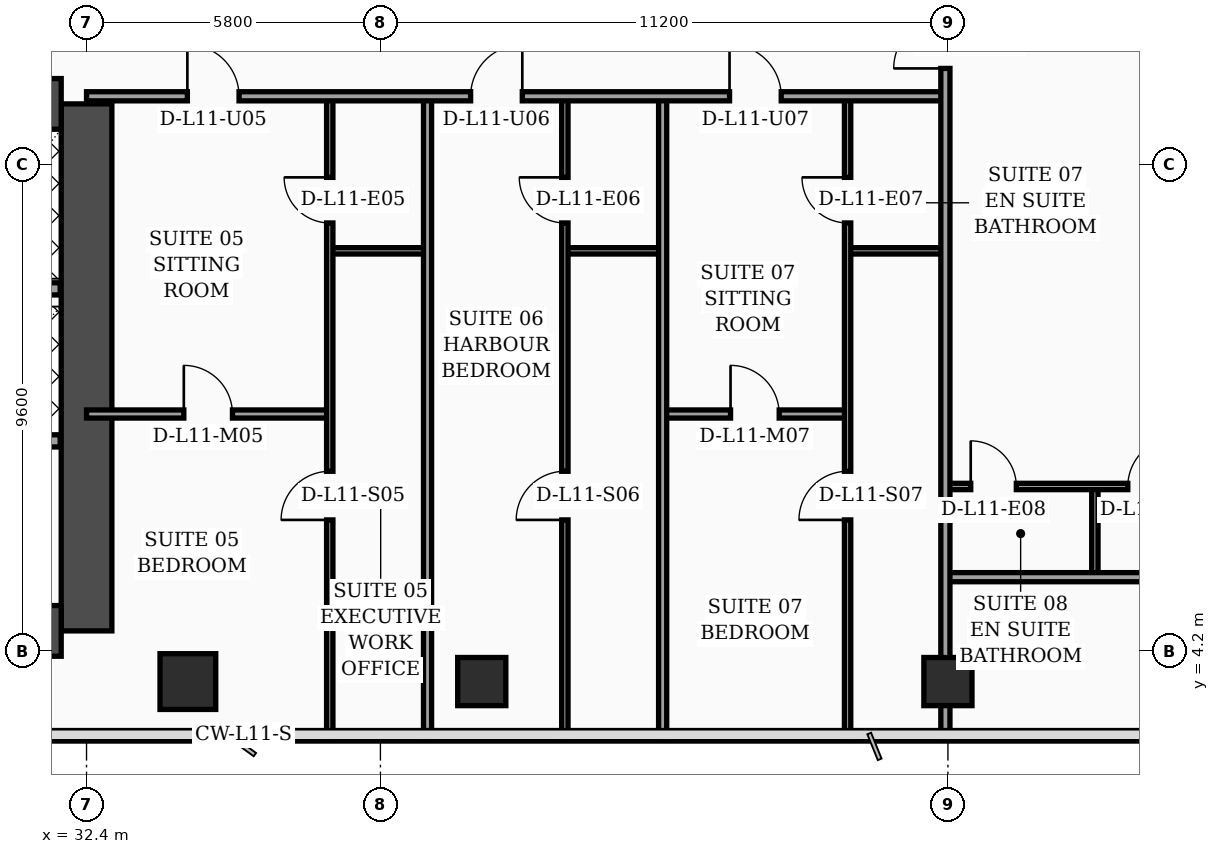
"""IFC4 building model, lengths in metres.
Left out: names, types, materials, properties, quantities, classifications, styles, units other than length and angle.
Written with IfcOpenShell. Run it as: python <this file> out.ifc"""

import sys

from ifc_helpers import new_model, si_unit, direction, frame, frame_2d, origin, origin_2d, place, context, subcontext, project, spatial, rectangle, hollow_rectangle, extrude, element, fill, save


model = new_model("IFC4")
c1 = context("Model", 3, precision=1e-05, world=origin(), true_north=direction((0.0, 1.0)))
c2 = subcontext(c1, "Body", "Model", "MODEL_VIEW")
j1 = project(units=[si_unit("LENGTHUNIT", "METRE"), si_unit("PLANEANGLEUNIT", "RADIAN")], contexts=[c1])
p1 = place(None, origin())
s1 = spatial("IfcSite", under=j1, at=p1, CompositionType="ELEMENT")
p2 = place(p1, origin())
s2 = spatial("IfcBuilding", under=s1, at=p2, CompositionType="ELEMENT")
p3 = place(p2, frame((0.0, 0.0, 50.8)))
s3 = spatial("IfcBuildingStorey", under=s2, at=p3, CompositionType="ELEMENT", Elevation=50.8)
p4 = place(p3, frame((32.4, 4.6, 0.0), z_axis=(0.0, 0.0, 1.0), x_axis=(0.0, 1.0, 0.0)))
e1 = element("IfcWall", 1, at=p4, inside=s3, PredefinedType="SHEAR", context=c2, shape_type="SweptSolid", body=[
    extrude(rectangle(XDim=10.4, YDim=1.0, at=frame_2d((5.2, 0.0))), origin(), (0.0, 0.0, 1.0), 3.56),
])
p5 = place(p3, frame((22.1, 15.0, 0.0), z_axis=(0.0, 0.0, 1.0), x_axis=(1.0, 0.0, 0.0)))
e2 = element("IfcWall", 2, at=p5, inside=s3, PredefinedType="SHEAR", context=c2, shape_type="SweptSolid", body=[
    extrude(rectangle(XDim=9.8, YDim=1.0, at=frame_2d((4.9, 0.0))), origin(), (0.0, 0.0, 1.0), 3.56),
])
p6 = place(p5, frame((4.8, 0.0, 0.0)))
e3 = element("IfcOpeningElement", 3, at=p6, cuts=e2, PredefinedType="OPENING", context=c2, shape_type="SweptSolid", body=[
    extrude(rectangle(XDim=1.1, YDim=2.2, at=frame_2d((0.55, 1.1))), frame((0.0, 0.51, 0.0), z_axis=(0.0, -1.0, 0.0), x_axis=(1.0, 0.0, 0.0)), (0.0, 0.0, 1.0), 1.02),
])
p7 = place(p3, frame((22.1, 4.6, 0.0), z_axis=(0.0, 0.0, 1.0), x_axis=(1.0, 0.0, 0.0)))
e4 = element("IfcWall", 4, at=p7, inside=s3, PredefinedType="SHEAR", context=c2, shape_type="SweptSolid", body=[
    extrude(rectangle(XDim=9.8, YDim=1.0, at=frame_2d((4.9, 0.0))), origin(), (0.0, 0.0, 1.0), 3.56),
])
p8 = place(p3, frame((34.4, 3.6, 0.0), z_axis=(0.0, 0.0, 1.0), x_axis=(1.0, 0.0, 0.0)))
e5 = element("IfcColumn", 5, at=p8, inside=s3, PredefinedType="COLUMN", context=c2, shape_type="SweptSolid", body=[
    extrude(hollow_rectangle(XDim=1.1, YDim=1.1, WallThickness=0.045, at=origin_2d()), origin(), (0.0, 0.0, 1.0), 3.56),
])
for number, where, z_axis, x_axis in (
    (6, (40.2, 3.6, 0.0), (0.0, 0.0, 1.0), (1.0, 0.0, 0.0)),
    (7, (49.4, 3.6, 0.0), (0.0, 0.0, 1.0), (1.0, 0.0, 0.0)),
):
    element("IfcColumn", number, at=place(p3, frame(where, z_axis=z_axis, x_axis=x_axis)), inside=s3, PredefinedType="COLUMN", context=c2, shape_type="SweptSolid", body=[
        extrude(hollow_rectangle(XDim=0.95, YDim=0.95, WallThickness=0.04, at=origin_2d()), origin(), (0.0, 0.0, 1.0), 3.56),
    ])
p9 = place(p3, frame((27.02, 11.35, 0.0), z_axis=(0.0, 0.0, 1.0), x_axis=(1.0, 0.0, 0.0)))
e8 = element("IfcWall", 8, at=p9, inside=s3, PredefinedType="SOLIDWALL", context=c2, shape_type="SweptSolid", body=[
    extrude(rectangle(XDim=4.86, YDim=0.24, at=frame_2d((2.43, 0.0))), origin(), (0.0, 0.0, 1.0), 3.56),
])
p10 = place(p9, frame((0.45, 0.0, 0.0)))
e9 = element("IfcOpeningElement", 9, at=p10, cuts=e8, PredefinedType="OPENING", context=c2, shape_type="SweptSolid", body=[
    extrude(rectangle(XDim=1.3, YDim=2.35, at=frame_2d((0.65, 1.175))), frame((0.0, 0.13, 0.0), z_axis=(0.0, -1.0, 0.0), x_axis=(1.0, 0.0, 0.0)), (0.0, 0.0, 1.0), 0.26),
])
p11 = place(p3, frame((27.02, 8.35, 0.0), z_axis=(0.0, 0.0, 1.0), x_axis=(1.0, 0.0, 0.0)))
e10 = element("IfcWall", 10, at=p11, inside=s3, PredefinedType="SOLIDWALL", context=c2, shape_type="SweptSolid", body=[
    extrude(rectangle(XDim=4.86, YDim=0.24, at=frame_2d((2.43, 0.0))), origin(), (0.0, 0.0, 1.0), 3.09),
])
p12 = place(p3, frame((37.2, 12.1, 0.0), z_axis=(0.0, 0.0, 1.0), x_axis=(1.0, 0.0, 0.0)))
e11 = element("IfcWall", 11, at=p12, inside=s3, PredefinedType="PARTITIONING", context=c2, shape_type="SweptSolid", body=[
    extrude(rectangle(XDim=1.93, YDim=0.125, at=frame_2d((0.965, 0.0))), origin(), (0.0, 0.0, 1.0), 3.56),
])
p13 = place(p3, frame((32.4, 8.88, 0.0), z_axis=(0.0, 0.0, 1.0), x_axis=(1.0, 0.0, 0.0)))
e12 = element("IfcWall", 12, at=p13, inside=s3, PredefinedType="PARTITIONING", context=c2, shape_type="SweptSolid", body=[
    extrude(rectangle(XDim=4.8, YDim=0.16, at=frame_2d((2.4, 0.0))), origin(), (0.0, 0.0, 1.0), 2.84),
])
p14 = place(p13, frame((1.92, 0.0, 0.0)))
e13 = element("IfcOpeningElement", 13, at=p14, cuts=e12, PredefinedType="OPENING", context=c2, shape_type="SweptSolid", body=[
    extrude(rectangle(XDim=0.96, YDim=2.2, at=frame_2d((0.48, 1.1))), frame((0.0, 0.09, 0.0), z_axis=(0.0, -1.0, 0.0), x_axis=(1.0, 0.0, 0.0)), (0.0, 0.0, 1.0), 0.18),
])
p15 = place(p3, frame((37.2, 2.44, 0.0), z_axis=(0.0, 0.0, 1.0), x_axis=(0.0, 1.0, 0.0)))
e14 = element("IfcWall", 14, at=p15, inside=s3, PredefinedType="PARTITIONING", context=c2, shape_type="SweptSolid", body=[
    extrude(rectangle(XDim=12.71, YDim=0.125, at=frame_2d((6.355, 0.0))), origin(), (0.0, 0.0, 1.0), 2.84),
])
p16 = place(p15, frame((4.35, 0.0, 0.0)))
e15 = element("IfcOpeningElement", 15, at=p16, cuts=e14, PredefinedType="OPENING", context=c2, shape_type="SweptSolid", body=[
    extrude(rectangle(XDim=0.96, YDim=2.2, at=frame_2d((0.48, 1.1))), frame((0.0, 0.073, 0.0), z_axis=(0.0, -1.0, 0.0), x_axis=(1.0, 0.0, 0.0)), (0.0, 0.0, 1.0), 0.145),
])
p17 = place(p15, frame((10.21, 0.0, 0.0)))
e16 = element("IfcOpeningElement", 16, at=p17, cuts=e14, PredefinedType="OPENING", context=c2, shape_type="SweptSolid", body=[
    extrude(rectangle(XDim=0.9, YDim=2.15, at=frame_2d((0.45, 1.075))), frame((0.0, 0.073, 0.0), z_axis=(0.0, -1.0, 0.0), x_axis=(1.0, 0.0, 0.0)), (0.0, 0.0, 1.0), 0.145),
])
p18 = place(p3, frame((41.84, 12.1, 0.0), z_axis=(0.0, 0.0, 1.0), x_axis=(1.0, 0.0, 0.0)))
e17 = element("IfcWall", 17, at=p18, inside=s3, PredefinedType="PARTITIONING", context=c2, shape_type="SweptSolid", body=[
    extrude(rectangle(XDim=1.93, YDim=0.125, at=frame_2d((0.965, 0.0))), origin(), (0.0, 0.0, 1.0), 3.56),
])
p19 = place(p3, frame((41.84, 2.44, 0.0), z_axis=(0.0, 0.0, 1.0), x_axis=(0.0, 1.0, 0.0)))
e18 = element("IfcWall", 18, at=p19, inside=s3, PredefinedType="PARTITIONING", context=c2, shape_type="SweptSolid", body=[
    extrude(rectangle(XDim=12.71, YDim=0.125, at=frame_2d((6.355, 0.0))), origin(), (0.0, 0.0, 1.0), 3.04),
])
p20 = place(p19, frame((4.35, 0.0, 0.0)))
e19 = element("IfcOpeningElement", 19, at=p20, cuts=e18, PredefinedType="OPENING", context=c2, shape_type="SweptSolid", body=[
    extrude(rectangle(XDim=0.96, YDim=2.2, at=frame_2d((0.48, 1.1))), frame((0.0, 0.073, 0.0), z_axis=(0.0, -1.0, 0.0), x_axis=(1.0, 0.0, 0.0)), (0.0, 0.0, 1.0), 0.145),
])
p21 = place(p19, frame((10.21, 0.0, 0.0)))
e20 = element("IfcOpeningElement", 20, at=p21, cuts=e18, PredefinedType="OPENING", context=c2, shape_type="SweptSolid", body=[
    extrude(rectangle(XDim=0.9, YDim=2.15, at=frame_2d((0.45, 1.075))), frame((0.0, 0.073, 0.0), z_axis=(0.0, -1.0, 0.0), x_axis=(1.0, 0.0, 0.0)), (0.0, 0.0, 1.0), 0.145),
])
p22 = place(p3, frame((39.13, 2.44, 0.0), z_axis=(0.0, 0.0, 1.0), x_axis=(0.0, 1.0, 0.0)))
e21 = element("IfcWall", 21, at=p22, inside=s3, PredefinedType="PARTITIONING", context=c2, shape_type="SweptSolid", body=[
    extrude(rectangle(XDim=12.71, YDim=0.16, at=frame_2d((6.355, 0.0))), origin(), (0.0, 0.0, 1.0), 2.84),
])
p23 = place(p3, frame((47.42, 12.1, 0.0), z_axis=(0.0, 0.0, 1.0), x_axis=(1.0, 0.0, 0.0)))
e22 = element("IfcWall", 22, at=p23, inside=s3, PredefinedType="PARTITIONING", context=c2, shape_type="SweptSolid", body=[
    extrude(rectangle(XDim=1.93, YDim=0.125, at=frame_2d((0.965, 0.0))), origin(), (0.0, 0.0, 1.0), 2.84),
])
p24 = place(p3, frame((43.77, 8.88, 0.0), z_axis=(0.0, 0.0, 1.0), x_axis=(1.0, 0.0, 0.0)))
e23 = element("IfcWall", 23, at=p24, inside=s3, PredefinedType="PARTITIONING", context=c2, shape_type="SweptSolid", body=[
    extrude(rectangle(XDim=3.65, YDim=0.16, at=frame_2d((1.825, 0.0))), origin(), (0.0, 0.0, 1.0), 3.09),
])
p25 = place(p24, frame((1.34, 0.0, 0.0)))
e24 = element("IfcOpeningElement", 24, at=p25, cuts=e23, PredefinedType="OPENING", context=c2, shape_type="SweptSolid", body=[
    extrude(rectangle(XDim=0.96, YDim=2.2, at=frame_2d((0.48, 1.1))), frame((0.0, 0.09, 0.0), z_axis=(0.0, -1.0, 0.0), x_axis=(1.0, 0.0, 0.0)), (0.0, 0.0, 1.0), 0.18),
])
p26 = place(p3, frame((47.42, 2.44, 0.0), z_axis=(0.0, 0.0, 1.0), x_axis=(0.0, 1.0, 0.0)))
e25 = element("IfcWall", 25, at=p26, inside=s3, PredefinedType="PARTITIONING", context=c2, shape_type="SweptSolid", body=[
    extrude(rectangle(XDim=12.71, YDim=0.125, at=frame_2d((6.355, 0.0))), origin(), (0.0, 0.0, 1.0), 2.84),
])
p27 = place(p26, frame((4.35, 0.0, 0.0)))
e26 = element("IfcOpeningElement", 26, at=p27, cuts=e25, PredefinedType="OPENING", context=c2, shape_type="SweptSolid", body=[
    extrude(rectangle(XDim=0.96, YDim=2.2, at=frame_2d((0.48, 1.1))), frame((0.0, 0.073, 0.0), z_axis=(0.0, -1.0, 0.0), x_axis=(1.0, 0.0, 0.0)), (0.0, 0.0, 1.0), 0.145),
])
p28 = place(p26, frame((10.21, 0.0, 0.0)))
e27 = element("IfcOpeningElement", 27, at=p28, cuts=e25, PredefinedType="OPENING", context=c2, shape_type="SweptSolid", body=[
    extrude(rectangle(XDim=0.9, YDim=2.15, at=frame_2d((0.45, 1.075))), frame((0.0, 0.073, 0.0), z_axis=(0.0, -1.0, 0.0), x_axis=(1.0, 0.0, 0.0)), (0.0, 0.0, 1.0), 0.145),
])
p29 = place(p3, frame((43.77, 2.44, 0.0), z_axis=(0.0, 0.0, 1.0), x_axis=(0.0, 1.0, 0.0)))
e28 = element("IfcWall", 28, at=p29, inside=s3, PredefinedType="PARTITIONING", context=c2, shape_type="SweptSolid", body=[
    extrude(rectangle(XDim=12.71, YDim=0.16, at=frame_2d((6.355, 0.0))), origin(), (0.0, 0.0, 1.0), 3.04),
])
p30 = place(p3, frame((32.4, 15.15, 0.0), z_axis=(0.0, 0.0, 1.0), x_axis=(1.0, 0.0, 0.0)))
e29 = element("IfcWall", 29, at=p30, inside=s3, PredefinedType="PARTITIONING", context=c2, shape_type="SweptSolid", body=[
    extrude(rectangle(XDim=16.95, YDim=0.18, at=frame_2d((8.475, 0.0))), origin(), (0.0, 0.0, 1.0), 2.84),
])
p31 = place(p30, frame((1.99, 0.0, 0.0)))
e30 = element("IfcOpeningElement", 30, at=p31, cuts=e29, PredefinedType="OPENING", context=c2, shape_type="SweptSolid", body=[
    extrude(rectangle(XDim=1.02, YDim=2.2, at=frame_2d((0.51, 1.1))), frame((0.0, 0.1, 0.0), z_axis=(0.0, -1.0, 0.0), x_axis=(1.0, 0.0, 0.0)), (0.0, 0.0, 1.0), 0.2),
])
p32 = place(p30, frame((7.58, 0.0, 0.0)))
e31 = element("IfcOpeningElement", 31, at=p32, cuts=e29, PredefinedType="OPENING", context=c2, shape_type="SweptSolid", body=[
    extrude(rectangle(XDim=1.02, YDim=2.2, at=frame_2d((0.51, 1.1))), frame((0.0, 0.1, 0.0), z_axis=(0.0, -1.0, 0.0), x_axis=(1.0, 0.0, 0.0)), (0.0, 0.0, 1.0), 0.2),
])
p33 = place(p30, frame((12.69, 0.0, 0.0)))
e32 = element("IfcOpeningElement", 32, at=p33, cuts=e29, PredefinedType="OPENING", context=c2, shape_type="SweptSolid", body=[
    extrude(rectangle(XDim=1.02, YDim=2.2, at=frame_2d((0.51, 1.1))), frame((0.0, 0.1, 0.0), z_axis=(0.0, -1.0, 0.0), x_axis=(1.0, 0.0, 0.0)), (0.0, 0.0, 1.0), 0.2),
])
p34 = place(p3, frame((52.3, 5.66, 0.0), z_axis=(0.0, 0.0, 1.0), x_axis=(0.0, 1.0, 0.0)))
e33 = element("IfcWall", 33, at=p34, inside=s3, PredefinedType="PARTITIONING", context=c2, shape_type="SweptSolid", body=[
    extrude(rectangle(XDim=1.79, YDim=0.125, at=frame_2d((0.895, 0.0))), origin(), (0.0, 0.0, 1.0), 3.56),
])
p35 = place(p3, frame((49.35, 7.45, 0.0), z_axis=(0.0, 0.0, 1.0), x_axis=(1.0, 0.0, 0.0)))
e34 = element("IfcWall", 34, at=p35, inside=s3, PredefinedType="PARTITIONING", context=c2, shape_type="SweptSolid", body=[
    extrude(rectangle(XDim=13.61, YDim=0.125, at=frame_2d((6.805, 0.0))), origin(), (0.0, 0.0, 1.0), 3.04),
])
p36 = place(p35, frame((0.5, 0.0, 0.0)))
e35 = element("IfcOpeningElement", 35, at=p36, cuts=e34, PredefinedType="OPENING", context=c2, shape_type="SweptSolid", body=[
    extrude(rectangle(XDim=0.9, YDim=2.15, at=frame_2d((0.45, 1.075))), frame((0.0, 0.073, 0.0), z_axis=(0.0, -1.0, 0.0), x_axis=(1.0, 0.0, 0.0)), (0.0, 0.0, 1.0), 0.145),
])
p37 = place(p35, frame((3.6, 0.0, 0.0)))
e36 = element("IfcOpeningElement", 36, at=p37, cuts=e34, PredefinedType="OPENING", context=c2, shape_type="SweptSolid", body=[
    extrude(rectangle(XDim=0.96, YDim=2.2, at=frame_2d((0.48, 1.1))), frame((0.0, 0.073, 0.0), z_axis=(0.0, -1.0, 0.0), x_axis=(1.0, 0.0, 0.0)), (0.0, 0.0, 1.0), 0.145),
])
p38 = place(p3, frame((49.35, 5.66, 0.0), z_axis=(0.0, 0.0, 1.0), x_axis=(1.0, 0.0, 0.0)))
e37 = element("IfcWall", 37, at=p38, inside=s3, PredefinedType="PARTITIONING", context=c2, shape_type="SweptSolid", body=[
    extrude(rectangle(XDim=11.05, YDim=0.18, at=frame_2d((5.525, 0.0))), origin(), (0.0, 0.0, 1.0), 2.84),
])
p39 = place(p3, frame((49.35, 2.44, 0.0), z_axis=(0.0, 0.0, 1.0), x_axis=(0.0, 1.0, 0.0)))
e38 = element("IfcWall", 38, at=p39, inside=s3, PredefinedType="PARTITIONING", context=c2, shape_type="SweptSolid", body=[
    extrude(rectangle(XDim=27.84, YDim=0.18, at=frame_2d((13.92, 0.0))), origin(), (0.0, 0.0, 1.0), 2.84),
])
p40 = place(p39, frame((13.26, 0.0, 0.0)))
e39 = element("IfcOpeningElement", 39, at=p40, cuts=e38, PredefinedType="OPENING", context=c2, shape_type="SweptSolid", body=[
    extrude(rectangle(XDim=1.02, YDim=2.2, at=frame_2d((0.51, 1.1))), frame((0.0, 0.1, 0.0), z_axis=(0.0, -1.0, 0.0), x_axis=(1.0, 0.0, 0.0)), (0.0, 0.0, 1.0), 0.2),
])
p41 = place(p39, frame((21.52, 0.0, 0.0)))
e40 = element("IfcOpeningElement", 40, at=p41, cuts=e38, PredefinedType="OPENING", context=c2, shape_type="SweptSolid", body=[
    extrude(rectangle(XDim=1.02, YDim=2.2, at=frame_2d((0.51, 1.1))), frame((0.0, 0.1, 0.0), z_axis=(0.0, -1.0, 0.0), x_axis=(1.0, 0.0, 0.0)), (0.0, 0.0, 1.0), 0.2),
])
p42 = place(p14, origin())
e41 = element("IfcDoor", 41, at=p42, inside=s3, OperationType="SINGLE_SWING_LEFT", PredefinedType="DOOR", context=c2, shape_type="SweptSolid", body=[
    extrude(rectangle(XDim=0.96, YDim=2.2, at=frame_2d((0.48, 1.1))), frame((0.0, 0.025, 0.0), z_axis=(0.0, -1.0, 0.0), x_axis=(1.0, 0.0, 0.0)), (0.0, 0.0, 1.0), 0.05),
])
fill(e13, e41)
p43 = place(p16, origin())
e42 = element("IfcDoor", 42, at=p43, inside=s3, OperationType="SINGLE_SWING_LEFT", PredefinedType="DOOR", context=c2, shape_type="SweptSolid", body=[
    extrude(rectangle(XDim=0.96, YDim=2.2, at=frame_2d((0.48, 1.1))), frame((0.0, 0.025, 0.0), z_axis=(0.0, -1.0, 0.0), x_axis=(1.0, 0.0, 0.0)), (0.0, 0.0, 1.0), 0.05),
])
fill(e15, e42)
p44 = place(p17, origin())
e43 = element("IfcDoor", 43, at=p44, inside=s3, OperationType="SINGLE_SWING_RIGHT", PredefinedType="DOOR", context=c2, shape_type="SweptSolid", body=[
    extrude(rectangle(XDim=0.9, YDim=2.15, at=frame_2d((0.45, 1.075))), frame((0.0, 0.025, 0.0), z_axis=(0.0, -1.0, 0.0), x_axis=(1.0, 0.0, 0.0)), (0.0, 0.0, 1.0), 0.05),
])
fill(e16, e43)
p45 = place(p20, origin())
e44 = element("IfcDoor", 44, at=p45, inside=s3, OperationType="SINGLE_SWING_LEFT", PredefinedType="DOOR", context=c2, shape_type="SweptSolid", body=[
    extrude(rectangle(XDim=0.96, YDim=2.2, at=frame_2d((0.48, 1.1))), frame((0.0, 0.025, 0.0), z_axis=(0.0, -1.0, 0.0), x_axis=(1.0, 0.0, 0.0)), (0.0, 0.0, 1.0), 0.05),
])
fill(e19, e44)
p46 = place(p21, origin())
e45 = element("IfcDoor", 45, at=p46, inside=s3, OperationType="SINGLE_SWING_RIGHT", PredefinedType="DOOR", context=c2, shape_type="SweptSolid", body=[
    extrude(rectangle(XDim=0.9, YDim=2.15, at=frame_2d((0.45, 1.075))), frame((0.0, 0.025, 0.0), z_axis=(0.0, -1.0, 0.0), x_axis=(1.0, 0.0, 0.0)), (0.0, 0.0, 1.0), 0.05),
])
fill(e20, e45)
p47 = place(p25, origin())
e46 = element("IfcDoor", 46, at=p47, inside=s3, OperationType="SINGLE_SWING_LEFT", PredefinedType="DOOR", context=c2, shape_type="SweptSolid", body=[
    extrude(rectangle(XDim=0.96, YDim=2.2, at=frame_2d((0.48, 1.1))), frame((0.0, 0.025, 0.0), z_axis=(0.0, -1.0, 0.0), x_axis=(1.0, 0.0, 0.0)), (0.0, 0.0, 1.0), 0.05),
])
fill(e24, e46)
p48 = place(p27, origin())
e47 = element("IfcDoor", 47, at=p48, inside=s3, OperationType="SINGLE_SWING_LEFT", PredefinedType="DOOR", context=c2, shape_type="SweptSolid", body=[
    extrude(rectangle(XDim=0.96, YDim=2.2, at=frame_2d((0.48, 1.1))), frame((0.0, 0.025, 0.0), z_axis=(0.0, -1.0, 0.0), x_axis=(1.0, 0.0, 0.0)), (0.0, 0.0, 1.0), 0.05),
])
fill(e26, e47)
p49 = place(p28, origin())
e48 = element("IfcDoor", 48, at=p49, inside=s3, OperationType="SINGLE_SWING_RIGHT", PredefinedType="DOOR", context=c2, shape_type="SweptSolid", body=[
    extrude(rectangle(XDim=0.9, YDim=2.15, at=frame_2d((0.45, 1.075))), frame((0.0, 0.025, 0.0), z_axis=(0.0, -1.0, 0.0), x_axis=(1.0, 0.0, 0.0)), (0.0, 0.0, 1.0), 0.05),
])
fill(e27, e48)
p50 = place(p31, origin())
e49 = element("IfcDoor", 49, at=p50, inside=s3, OperationType="SINGLE_SWING_LEFT", PredefinedType="DOOR", context=c2, shape_type="SweptSolid", body=[
    extrude(rectangle(XDim=1.02, YDim=2.2, at=frame_2d((0.51, 1.1))), frame((0.0, 0.025, 0.0), z_axis=(0.0, -1.0, 0.0), x_axis=(1.0, 0.0, 0.0)), (0.0, 0.0, 1.0), 0.05),
])
fill(e30, e49)
p51 = place(p32, origin())
e50 = element("IfcDoor", 50, at=p51, inside=s3, OperationType="SINGLE_SWING_RIGHT", PredefinedType="DOOR", context=c2, shape_type="SweptSolid", body=[
    extrude(rectangle(XDim=1.02, YDim=2.2, at=frame_2d((0.51, 1.1))), frame((0.0, 0.025, 0.0), z_axis=(0.0, -1.0, 0.0), x_axis=(1.0, 0.0, 0.0)), (0.0, 0.0, 1.0), 0.05),
])
fill(e31, e50)
p52 = place(p33, origin())
e51 = element("IfcDoor", 51, at=p52, inside=s3, OperationType="SINGLE_SWING_LEFT", PredefinedType="DOOR", context=c2, shape_type="SweptSolid", body=[
    extrude(rectangle(XDim=1.02, YDim=2.2, at=frame_2d((0.51, 1.1))), frame((0.0, 0.025, 0.0), z_axis=(0.0, -1.0, 0.0), x_axis=(1.0, 0.0, 0.0)), (0.0, 0.0, 1.0), 0.05),
])
fill(e32, e51)
p53 = place(p36, origin())
e52 = element("IfcDoor", 52, at=p53, inside=s3, OperationType="SINGLE_SWING_LEFT", PredefinedType="DOOR", context=c2, shape_type="SweptSolid", body=[
    extrude(rectangle(XDim=0.9, YDim=2.15, at=frame_2d((0.45, 1.075))), frame((0.0, 0.025, 0.0), z_axis=(0.0, -1.0, 0.0), x_axis=(1.0, 0.0, 0.0)), (0.0, 0.0, 1.0), 0.05),
])
fill(e35, e52)
p54 = place(p37, origin())
e53 = element("IfcDoor", 53, at=p54, inside=s3, OperationType="SINGLE_SWING_RIGHT", PredefinedType="DOOR", context=c2, shape_type="SweptSolid", body=[
    extrude(rectangle(XDim=0.96, YDim=2.2, at=frame_2d((0.48, 1.1))), frame((0.0, 0.025, 0.0), z_axis=(0.0, -1.0, 0.0), x_axis=(1.0, 0.0, 0.0)), (0.0, 0.0, 1.0), 0.05),
])
fill(e36, e53)
p55 = place(p40, origin())
e54 = element("IfcDoor", 54, at=p55, inside=s3, OperationType="SINGLE_SWING_LEFT", PredefinedType="DOOR", context=c2, shape_type="SweptSolid", body=[
    extrude(rectangle(XDim=1.02, YDim=2.2, at=frame_2d((0.51, 1.1))), frame((0.0, 0.025, 0.0), z_axis=(0.0, -1.0, 0.0), x_axis=(1.0, 0.0, 0.0)), (0.0, 0.0, 1.0), 0.05),
])
fill(e39, e54)
save(model, sys.argv[1])
